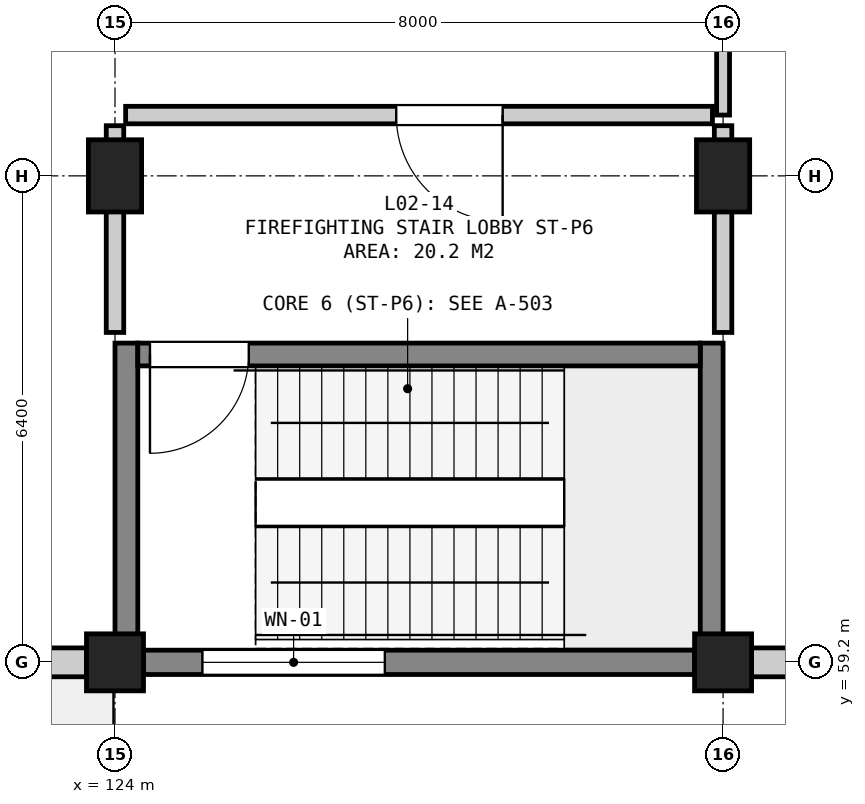
"""IFC4 building model, lengths in metres.
Left out: names, types, materials, properties, quantities, classifications, styles, units other than length and angle.
Written with IfcOpenShell. Run it as: python <this file> out.ifc"""

import sys

from ifc_helpers import new_model, si_unit, direction, frame, frame_2d, origin, origin_2d, place, context, subcontext, project, spatial, rectangle, extrude, element, fill, save


model = new_model("IFC4")
c1 = context("Model", 3, precision=1e-05, world=origin(), true_north=direction((0.0, 1.0)))
c2 = subcontext(c1, "Body", "Model", "MODEL_VIEW")
j1 = project(units=[si_unit("LENGTHUNIT", "METRE"), si_unit("PLANEANGLEUNIT", "RADIAN")], contexts=[c1])
p1 = place(None, origin())
s1 = spatial("IfcSite", under=j1, at=p1, CompositionType="ELEMENT")
p2 = place(p1, origin())
s2 = spatial("IfcBuilding", under=s1, at=p2, CompositionType="ELEMENT")
p3 = place(p2, frame((0.0, 0.0, 10.8)))
s3 = spatial("IfcBuildingStorey", under=s2, at=p3, CompositionType="ELEMENT", Elevation=10.8)
p4 = place(p3, frame((124.0, 59.2, 0.0), z_axis=(0.0, 0.0, 1.0), x_axis=(1.0, 0.0, 0.0)))
e1 = element("IfcColumn", 1, at=p4, inside=s3, PredefinedType="COLUMN", context=c2, shape_type="SweptSolid", body=[
    extrude(rectangle(XDim=0.75, YDim=0.75, at=origin_2d()), origin(), (0.0, 0.0, 1.0), 4.8),
])
p5 = place(p3, frame((124.0, 65.6, 0.0), z_axis=(0.0, 0.0, 1.0), x_axis=(1.0, 0.0, 0.0)))
e2 = element("IfcColumn", 2, at=p5, inside=s3, PredefinedType="COLUMN", context=c2, shape_type="SweptSolid", body=[
    extrude(rectangle(XDim=0.7, YDim=0.95, at=origin_2d()), origin(), (0.0, 0.0, 1.0), 4.8),
])
p6 = place(p3, frame((132.0, 59.2, 0.0), z_axis=(0.0, 0.0, 1.0), x_axis=(1.0, 0.0, 0.0)))
e3 = element("IfcColumn", 3, at=p6, inside=s3, PredefinedType="COLUMN", context=c2, shape_type="SweptSolid", body=[
    extrude(rectangle(XDim=0.75, YDim=0.75, at=origin_2d()), origin(), (0.0, 0.0, 1.0), 4.8),
])
p7 = place(p3, frame((132.0, 65.6, 0.0), z_axis=(0.0, 0.0, 1.0), x_axis=(1.0, 0.0, 0.0)))
e4 = element("IfcColumn", 4, at=p7, inside=s3, PredefinedType="COLUMN", context=c2, shape_type="SweptSolid", body=[
    extrude(rectangle(XDim=0.7, YDim=0.95, at=origin_2d()), origin(), (0.0, 0.0, 1.0), 4.8),
])
p8 = place(p3, frame((117.2, 59.2, 0.0), z_axis=(0.0, 0.0, 1.0), x_axis=(1.0, 0.0, 0.0)))
e5 = element("IfcWall", 5, at=p8, inside=s3, PredefinedType="SOLIDWALL", context=c2, shape_type="SweptSolid", body=[
    extrude(rectangle(XDim=6.425, YDim=0.38, at=frame_2d((3.212, 0.0))), origin(), (0.0, 0.0, 1.0), 3.9),
])
p9 = place(p8, frame((1.538, 0.0, 0.9)))
e6 = element("IfcOpeningElement", 6, at=p9, cuts=e5, PredefinedType="OPENING", context=c2, shape_type="SweptSolid", body=[
    extrude(rectangle(XDim=1.65, YDim=2.2, at=frame_2d((0.825, 1.1))), frame((0.0, 0.202, 0.0), z_axis=(0.0, -1.0, 0.0), x_axis=(1.0, 0.0, 0.0)), (0.0, 0.0, 1.0), 0.404),
])
p10 = place(p3, frame((124.375, 59.2, 0.0), z_axis=(0.0, 0.0, 1.0), x_axis=(1.0, 0.0, 0.0)))
e7 = element("IfcWall", 7, at=p10, inside=s3, PredefinedType="SOLIDWALL", context=c2, shape_type="SweptSolid", body=[
    extrude(rectangle(XDim=7.25, YDim=0.32, at=frame_2d((3.625, 0.0))), origin(), (0.0, 0.0, 1.0), 3.895),
])
p11 = place(p10, frame((0.775, 0.0, 0.9)))
e8 = element("IfcOpeningElement", 8, at=p11, cuts=e7, PredefinedType="OPENING", context=c2, shape_type="SweptSolid", body=[
    extrude(rectangle(XDim=2.4, YDim=2.2, at=frame_2d((1.2, 1.1))), frame((0.0, 0.172, 0.0), z_axis=(0.0, -1.0, 0.0), x_axis=(1.0, 0.0, 0.0)), (0.0, 0.0, 1.0), 0.344),
])
p12 = place(p3, frame((132.375, 59.2, 0.0), z_axis=(0.0, 0.0, 1.0), x_axis=(1.0, 0.0, 0.0)))
e9 = element("IfcWall", 9, at=p12, inside=s3, PredefinedType="SOLIDWALL", context=c2, shape_type="SweptSolid", body=[
    extrude(rectangle(XDim=7.425, YDim=0.38, at=frame_2d((3.712, 0.0))), origin(), (0.0, 0.0, 1.0), 3.9),
])
p13 = place(p12, frame((1.012, 0.0, 0.9)))
e10 = element("IfcOpeningElement", 10, at=p13, cuts=e9, PredefinedType="OPENING", context=c2, shape_type="SweptSolid", body=[
    extrude(rectangle(XDim=2.1, YDim=2.1, at=frame_2d((1.05, 1.05))), frame((0.0, 0.202, 0.0), z_axis=(0.0, -1.0, 0.0), x_axis=(1.0, 0.0, 0.0)), (0.0, 0.0, 1.0), 0.404),
])
for number, where, z_axis, x_axis in (
    (11, (124.15, 59.2, 0.0), (0.0, 0.0, 1.0), (0.0, 1.0, 0.0)),
    (12, (131.85, 59.2, 0.0), (0.0, 0.0, 1.0), (0.0, 1.0, 0.0)),
):
    element("IfcWall", number, at=place(p3, frame(where, z_axis=z_axis, x_axis=x_axis)), inside=s3, PredefinedType="SHEAR", context=c2, shape_type="SweptSolid", body=[
        extrude(rectangle(XDim=4.2, YDim=0.3, at=frame_2d((2.1, 0.0))), origin(), (0.0, 0.0, 1.0), 4.5),
    ])
p14 = place(p3, frame((124.3, 63.25, 0.0), z_axis=(0.0, 0.0, 1.0), x_axis=(1.0, 0.0, 0.0)))
e13 = element("IfcWall", 13, at=p14, inside=s3, PredefinedType="SHEAR", context=c2, shape_type="SweptSolid", body=[
    extrude(rectangle(XDim=7.4, YDim=0.3, at=frame_2d((3.7, 0.0))), origin(), (0.0, 0.0, 1.0), 4.5),
])
p15 = place(p14, frame((0.16, 0.0, 0.0)))
e14 = element("IfcOpeningElement", 14, at=p15, cuts=e13, PredefinedType="OPENING", context=c2, shape_type="SweptSolid", body=[
    extrude(rectangle(XDim=1.3, YDim=2.18, at=frame_2d((0.65, 1.09))), frame((0.0, 0.162, 0.0), z_axis=(0.0, -1.0, 0.0), x_axis=(1.0, 0.0, 0.0)), (0.0, 0.0, 1.0), 0.324),
])
p16 = place(p3, frame((124.14, 66.4, 0.0), z_axis=(0.0, 0.0, 1.0), x_axis=(1.0, 0.0, 0.0)))
e15 = element("IfcWall", 15, at=p16, inside=s3, PredefinedType="SOLIDWALL", context=c2, shape_type="SweptSolid", body=[
    extrude(rectangle(XDim=7.72, YDim=0.23, at=frame_2d((3.86, 0.0))), origin(), (0.0, 0.0, 1.0), 4.5),
])
p17 = place(p16, frame((3.56, 0.0, 0.0)))
e16 = element("IfcOpeningElement", 16, at=p17, cuts=e15, PredefinedType="OPENING", context=c2, shape_type="SweptSolid", body=[
    extrude(rectangle(XDim=1.4, YDim=2.2, at=frame_2d((0.7, 1.1))), frame((0.0, 0.127, 0.0), z_axis=(0.0, -1.0, 0.0), x_axis=(1.0, 0.0, 0.0)), (0.0, 0.0, 1.0), 0.254),
])
p18 = place(p3, frame((124.0, 63.54, 0.0), z_axis=(0.0, 0.0, 1.0), x_axis=(0.0, 1.0, 0.0)))
e17 = element("IfcWall", 17, at=p18, inside=s3, PredefinedType="SOLIDWALL", context=c2, shape_type="SweptSolid", body=[
    extrude(rectangle(XDim=2.72, YDim=0.23, at=frame_2d((1.36, 0.0))), origin(), (0.0, 0.0, 1.0), 3.895),
])
p19 = place(p3, frame((132.0, 63.54, 0.0), z_axis=(0.0, 0.0, 1.0), x_axis=(0.0, 1.0, 0.0)))
e18 = element("IfcWall", 18, at=p19, inside=s3, PredefinedType="SOLIDWALL", context=c2, shape_type="SweptSolid", body=[
    extrude(rectangle(XDim=2.72, YDim=0.23, at=frame_2d((1.36, 0.0))), origin(), (0.0, 0.0, 1.0), 3.745),
])
p20 = place(p3, frame((132.0, 66.4, 0.0), z_axis=(0.0, 0.0, 1.0), x_axis=(0.0, 1.0, 0.0)))
e19 = element("IfcWall", 19, at=p20, inside=s3, PredefinedType="PARTITIONING", context=c2, shape_type="SweptSolid", body=[
    extrude(rectangle(XDim=9.46, YDim=0.17, at=frame_2d((4.73, 0.0))), origin(), (0.0, 0.0, 1.0), 3.795),
])
p21 = place(p20, frame((2.2, 0.0, 0.0)))
e20 = element("IfcOpeningElement", 20, at=p21, cuts=e19, PredefinedType="OPENING", context=c2, shape_type="SweptSolid", body=[
    extrude(rectangle(XDim=1.2, YDim=2.15, at=frame_2d((0.6, 1.075))), frame((0.0, 0.097, 0.0), z_axis=(0.0, -1.0, 0.0), x_axis=(1.0, 0.0, 0.0)), (0.0, 0.0, 1.0), 0.194),
])
p22 = place(p11, origin())
e21 = element("IfcWindow", 21, at=p22, inside=s3, PartitioningType="DOUBLE_PANEL_VERTICAL", PredefinedType="WINDOW", context=c2, shape_type="SweptSolid", body=[
    extrude(rectangle(XDim=2.4, YDim=2.2, at=frame_2d((1.2, 1.1))), frame((0.0, 0.03, 0.0), z_axis=(0.0, -1.0, 0.0), x_axis=(1.0, 0.0, 0.0)), (0.0, 0.0, 1.0), 0.06),
])
fill(e8, e21)
p23 = place(p15, frame((1.3, 0.0, 0.0), z_axis=(0.0, 0.0, 1.0), x_axis=(-1.0, 0.0, 0.0)))
e22 = element("IfcDoor", 22, at=p23, inside=s3, OperationType="SINGLE_SWING_RIGHT", PredefinedType="DOOR", context=c2, shape_type="SweptSolid", body=[
    extrude(rectangle(XDim=1.3, YDim=2.18, at=frame_2d((0.65, 1.09))), frame((0.0, 0.025, 0.0), z_axis=(0.0, -1.0, 0.0), x_axis=(1.0, 0.0, 0.0)), (0.0, 0.0, 1.0), 0.05),
])
fill(e14, e22)
p24 = place(p17, frame((1.4, 0.0, 0.0), z_axis=(0.0, 0.0, 1.0), x_axis=(-1.0, 0.0, 0.0)))
e23 = element("IfcDoor", 23, at=p24, inside=s3, OperationType="SINGLE_SWING_LEFT", PredefinedType="DOOR", context=c2, shape_type="SweptSolid", body=[
    extrude(rectangle(XDim=1.4, YDim=2.2, at=frame_2d((0.7, 1.1))), frame((0.0, 0.025, 0.0), z_axis=(0.0, -1.0, 0.0), x_axis=(1.0, 0.0, 0.0)), (0.0, 0.0, 1.0), 0.05),
])
fill(e16, e23)
save(model, sys.argv[1])
